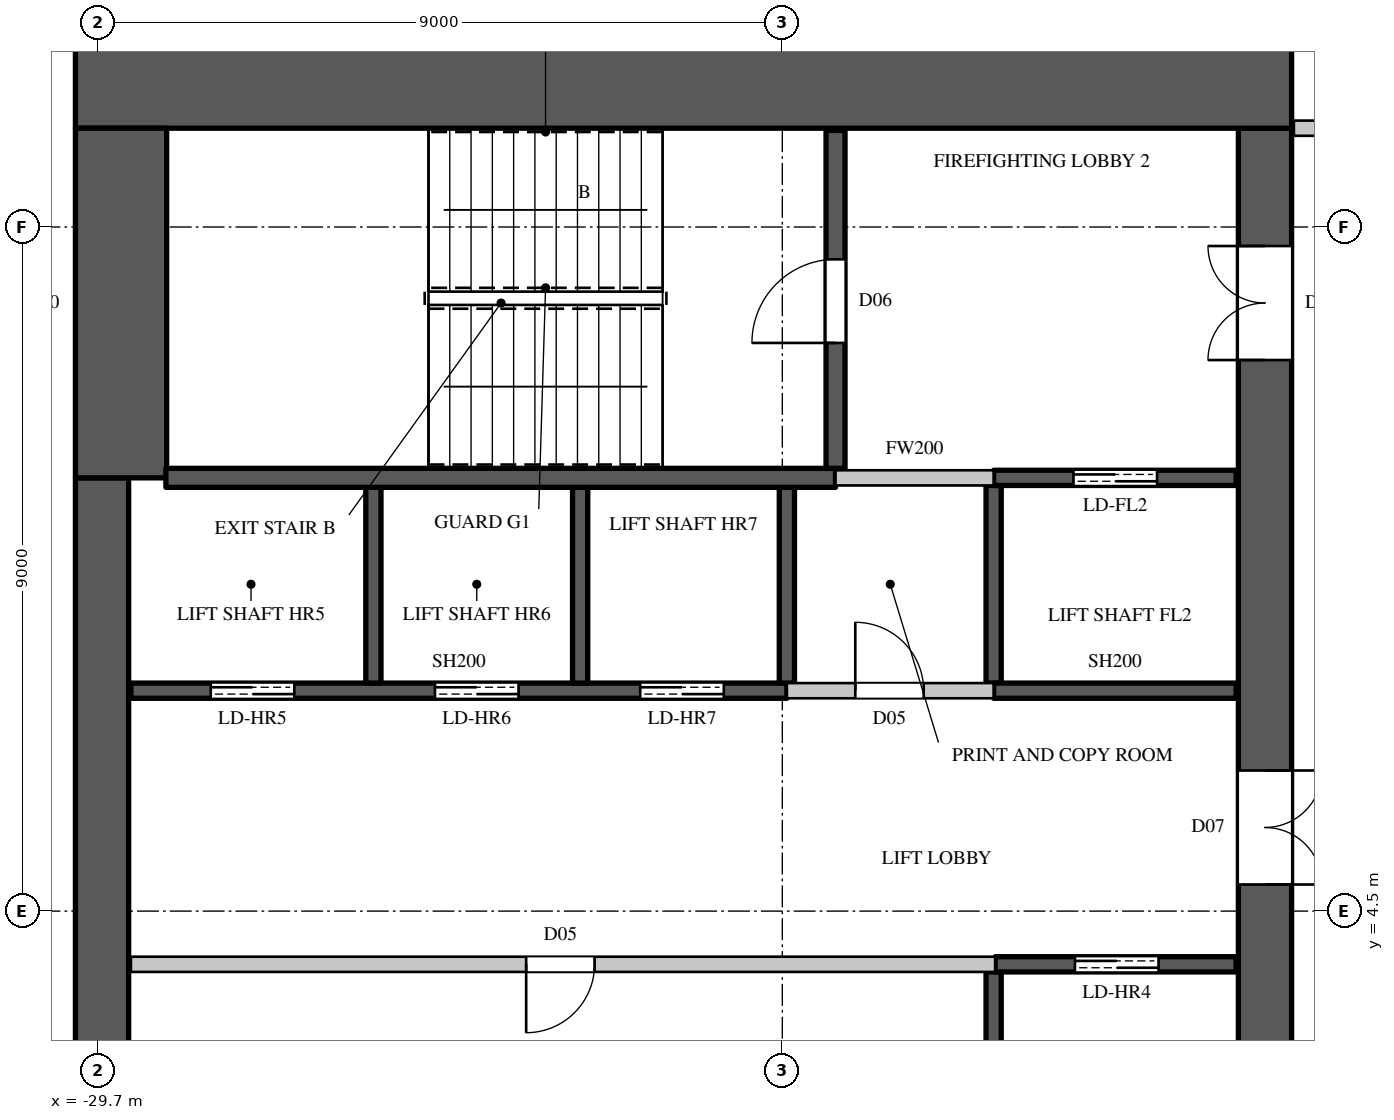
"""IFC4 building model, lengths in metres.
Left out: names, types, materials, properties, quantities, classifications, styles, units other than length and angle.
Written with IfcOpenShell. Run it as: python <this file> out.ifc"""

import sys

from ifc_helpers import new_model, si_unit, direction, frame, frame_2d, origin, place, context, subcontext, project, spatial, rectangle, extrude, element, fill, save


model = new_model("IFC4")
c1 = context("Model", 3, precision=1e-05, world=origin(), true_north=direction((0.0, 1.0)))
c2 = subcontext(c1, "Body", "Model", "MODEL_VIEW")
j1 = project(units=[si_unit("LENGTHUNIT", "METRE"), si_unit("PLANEANGLEUNIT", "RADIAN")], contexts=[c1])
p1 = place(None, origin())
s1 = spatial("IfcSite", under=j1, at=p1, CompositionType="ELEMENT")
p2 = place(p1, origin())
s2 = spatial("IfcBuilding", under=s1, at=p2, CompositionType="ELEMENT")
p3 = place(p2, frame((0.0, 0.0, 288.5)))
s3 = spatial("IfcBuildingStorey", under=s2, at=p3, CompositionType="ELEMENT", Elevation=288.5)
p4 = place(p3, frame((-30.0, 15.4, 0.0), z_axis=(0.0, 0.0, 1.0), x_axis=(1.0, 0.0, 0.0)))
e1 = element("IfcWall", 1, at=p4, inside=s3, PredefinedType="SHEAR", context=c2, shape_type="SweptSolid", body=[
    extrude(rectangle(XDim=16.0, YDim=1.2, at=frame_2d((8.0, 0.0))), origin(), (0.0, 0.0, 1.0), 4.1),
])
p5 = place(p3, frame((-14.35, -14.8, 0.0), z_axis=(0.0, 0.0, 1.0), x_axis=(0.0, 1.0, 0.0)))
e2 = element("IfcWall", 2, at=p5, inside=s3, PredefinedType="SHEAR", context=c2, shape_type="SweptSolid", body=[
    extrude(rectangle(XDim=29.6, YDim=0.7, at=frame_2d((14.8, 0.0))), origin(), (0.0, 0.0, 1.0), 4.1),
])
p6 = place(p5, frame((1.55, 0.0, 0.0)))
e3 = element("IfcOpeningElement", 3, at=p6, cuts=e2, PredefinedType="OPENING", context=c2, shape_type="SweptSolid", body=[
    extrude(rectangle(XDim=1.5, YDim=2.4, at=frame_2d((0.75, 1.2))), frame((0.0, 0.36, 0.0), z_axis=(0.0, -1.0, 0.0), x_axis=(1.0, 0.0, 0.0)), (0.0, 0.0, 1.0), 0.72),
])
p7 = place(p5, frame((26.55, 0.0, 0.0)))
e4 = element("IfcOpeningElement", 4, at=p7, cuts=e2, PredefinedType="OPENING", context=c2, shape_type="SweptSolid", body=[
    extrude(rectangle(XDim=1.5, YDim=2.4, at=frame_2d((0.75, 1.2))), frame((0.0, 0.36, 0.0), z_axis=(0.0, -1.0, 0.0), x_axis=(1.0, 0.0, 0.0)), (0.0, 0.0, 1.0), 0.72),
])
p8 = place(p5, frame((8.45, 0.0, 0.0)))
e5 = element("IfcOpeningElement", 5, at=p8, cuts=e2, PredefinedType="OPENING", context=c2, shape_type="SweptSolid", body=[
    extrude(rectangle(XDim=1.5, YDim=2.4, at=frame_2d((0.75, 1.2))), frame((0.0, 0.36, 0.0), z_axis=(0.0, -1.0, 0.0), x_axis=(1.0, 0.0, 0.0)), (0.0, 0.0, 1.0), 0.72),
])
p9 = place(p5, frame((19.65, 0.0, 0.0)))
e6 = element("IfcOpeningElement", 6, at=p9, cuts=e2, PredefinedType="OPENING", context=c2, shape_type="SweptSolid", body=[
    extrude(rectangle(XDim=1.5, YDim=2.4, at=frame_2d((0.75, 1.2))), frame((0.0, 0.36, 0.0), z_axis=(0.0, -1.0, 0.0), x_axis=(1.0, 0.0, 0.0)), (0.0, 0.0, 1.0), 0.72),
])
p10 = place(p5, frame((14.5, 0.0, 0.0)))
e7 = element("IfcOpeningElement", 7, at=p10, cuts=e2, PredefinedType="OPENING", context=c2, shape_type="SweptSolid", body=[
    extrude(rectangle(XDim=0.6, YDim=2.0, at=frame_2d((0.3, 1.0))), frame((0.0, 0.36, 0.0), z_axis=(0.0, -1.0, 0.0), x_axis=(1.0, 0.0, 0.0)), (0.0, 0.0, 1.0), 0.72),
])
p11 = place(p3, frame((-29.65, -10.2, 0.0), z_axis=(0.0, 0.0, 1.0), x_axis=(0.0, 1.0, 0.0)))
e8 = element("IfcWall", 8, at=p11, inside=s3, PredefinedType="SHEAR", context=c2, shape_type="SweptSolid", body=[
    extrude(rectangle(XDim=20.4, YDim=0.7, at=frame_2d((10.2, 0.0))), origin(), (0.0, 0.0, 1.0), 4.1),
])
p12 = place(p3, frame((-29.4, 10.2, 0.0), z_axis=(0.0, 0.0, 1.0), x_axis=(0.0, 1.0, 0.0)))
e9 = element("IfcWall", 9, at=p12, inside=s3, PredefinedType="SHEAR", context=c2, shape_type="SweptSolid", body=[
    extrude(rectangle(XDim=4.6, YDim=1.2, at=frame_2d((2.3, 0.0))), origin(), (0.0, 0.0, 1.0), 4.1),
])
p13 = place(p3, frame((-20.64, 7.4, 0.0), z_axis=(0.0, 0.0, 1.0), x_axis=(1.0, 0.0, 0.0)))
e10 = element("IfcWall", 10, at=p13, inside=s3, PredefinedType="PARTITIONING", context=c2, shape_type="SweptSolid", body=[
    extrude(rectangle(XDim=2.72, YDim=0.2, at=frame_2d((1.36, 0.0))), origin(), (0.0, 0.0, 1.0), 3.8),
])
p14 = place(p13, frame((0.9, 0.0, 0.0)))
e11 = element("IfcOpeningElement", 11, at=p14, cuts=e10, PredefinedType="OPENING", context=c2, shape_type="SweptSolid", body=[
    extrude(rectangle(XDim=0.9, YDim=2.2, at=frame_2d((0.45, 1.1))), frame((0.0, 0.11, 0.0), z_axis=(0.0, -1.0, 0.0), x_axis=(1.0, 0.0, 0.0)), (0.0, 0.0, 1.0), 0.22),
])
p15 = place(p3, frame((-20.0, 10.2, 0.0), z_axis=(0.0, 0.0, 1.0), x_axis=(1.0, 0.0, 0.0)))
e12 = element("IfcWall", 12, at=p15, inside=s3, PredefinedType="PARTITIONING", context=c2, shape_type="SweptSolid", body=[
    extrude(rectangle(XDim=2.08, YDim=0.2, at=frame_2d((1.04, 0.0))), origin(), (0.0, 0.0, 1.0), 3.8),
])
p16 = place(p3, frame((-13.97, 14.8, 0.0), z_axis=(0.0, 0.0, 1.0), x_axis=(1.0, 0.0, 0.0)))
e13 = element("IfcWall", 13, at=p16, inside=s3, PredefinedType="PARTITIONING", context=c2, shape_type="SweptSolid", body=[
    extrude(rectangle(XDim=2.87, YDim=0.2, at=frame_2d((1.435, 0.0))), origin(), (0.0, 0.0, 1.0), 3.8),
])
p17 = place(p3, frame((-29.27, 3.8, 0.0), z_axis=(0.0, 0.0, 1.0), x_axis=(1.0, 0.0, 0.0)))
e14 = element("IfcWall", 14, at=p17, inside=s3, PredefinedType="PARTITIONING", context=c2, shape_type="SweptSolid", body=[
    extrude(rectangle(XDim=11.37, YDim=0.2, at=frame_2d((5.685, 0.0))), origin(), (0.0, 0.0, 1.0), 3.8),
])
p18 = place(p17, frame((5.2, 0.0, 0.0)))
e15 = element("IfcOpeningElement", 15, at=p18, cuts=e14, PredefinedType="OPENING", context=c2, shape_type="SweptSolid", body=[
    extrude(rectangle(XDim=0.9, YDim=2.2, at=frame_2d((0.45, 1.1))), frame((0.0, 0.11, 0.0), z_axis=(0.0, -1.0, 0.0), x_axis=(1.0, 0.0, 0.0)), (0.0, 0.0, 1.0), 0.22),
])
p19 = place(p3, frame((-29.27, 7.4, 0.0), z_axis=(0.0, 0.0, 1.0), x_axis=(1.0, 0.0, 0.0)))
e16 = element("IfcWall", 16, at=p19, inside=s3, PredefinedType="SHEAR", context=c2, shape_type="SweptSolid", body=[
    extrude(rectangle(XDim=8.63, YDim=0.2, at=frame_2d((4.315, 0.0))), origin(), (0.0, 0.0, 1.0), 3.8),
])
p20 = place(p19, frame((1.05, 0.0, 0.0)))
e17 = element("IfcOpeningElement", 17, at=p20, cuts=e16, PredefinedType="OPENING", context=c2, shape_type="SweptSolid", body=[
    extrude(rectangle(XDim=1.1, YDim=2.2, at=frame_2d((0.55, 1.1))), frame((0.0, 0.11, 0.0), z_axis=(0.0, -1.0, 0.0), x_axis=(1.0, 0.0, 0.0)), (0.0, 0.0, 1.0), 0.22),
])
p21 = place(p19, frame((4.0, 0.0, 0.0)))
e18 = element("IfcOpeningElement", 18, at=p21, cuts=e16, PredefinedType="OPENING", context=c2, shape_type="SweptSolid", body=[
    extrude(rectangle(XDim=1.1, YDim=2.2, at=frame_2d((0.55, 1.1))), frame((0.0, 0.11, 0.0), z_axis=(0.0, -1.0, 0.0), x_axis=(1.0, 0.0, 0.0)), (0.0, 0.0, 1.0), 0.22),
])
p22 = place(p19, frame((6.7, 0.0, 0.0)))
e19 = element("IfcOpeningElement", 19, at=p22, cuts=e16, PredefinedType="OPENING", context=c2, shape_type="SweptSolid", body=[
    extrude(rectangle(XDim=1.1, YDim=2.2, at=frame_2d((0.55, 1.1))), frame((0.0, 0.11, 0.0), z_axis=(0.0, -1.0, 0.0), x_axis=(1.0, 0.0, 0.0)), (0.0, 0.0, 1.0), 0.22),
])
for number, where, z_axis, x_axis in (
    (20, (-26.08, 7.5, 0.0), (0.0, 0.0, 1.0), (0.0, 1.0, 0.0)),
    (21, (-23.36, 7.5, 0.0), (0.0, 0.0, 1.0), (0.0, 1.0, 0.0)),
):
    element("IfcWall", number, at=place(p3, frame(where, z_axis=z_axis, x_axis=x_axis)), inside=s3, PredefinedType="SHEAR", context=c2, shape_type="SweptSolid", body=[
        extrude(rectangle(XDim=2.575, YDim=0.2, at=frame_2d((1.288, 0.0))), origin(), (0.0, 0.0, 1.0), 4.1),
    ])
p23 = place(p3, frame((-20.64, 7.5, 0.0), z_axis=(0.0, 0.0, 1.0), x_axis=(0.0, 1.0, 0.0)))
e22 = element("IfcWall", 22, at=p23, inside=s3, PredefinedType="SHEAR", context=c2, shape_type="SweptSolid", body=[
    extrude(rectangle(XDim=2.575, YDim=0.2, at=frame_2d((1.288, 0.0))), origin(), (0.0, 0.0, 1.0), 3.8),
])
p24 = place(p3, frame((-17.92, 1.1, 0.0), z_axis=(0.0, 0.0, 1.0), x_axis=(0.0, 1.0, 0.0)))
e23 = element("IfcWall", 23, at=p24, inside=s3, PredefinedType="SHEAR", context=c2, shape_type="SweptSolid", body=[
    extrude(rectangle(XDim=2.6, YDim=0.2, at=frame_2d((1.3, 0.0))), origin(), (0.0, 0.0, 1.0), 3.8),
])
p25 = place(p3, frame((-17.9, 3.8, 0.0), z_axis=(0.0, 0.0, 1.0), x_axis=(1.0, 0.0, 0.0)))
e24 = element("IfcWall", 24, at=p25, inside=s3, PredefinedType="SHEAR", context=c2, shape_type="SweptSolid", body=[
    extrude(rectangle(XDim=3.17, YDim=0.2, at=frame_2d((1.585, 0.0))), origin(), (0.0, 0.0, 1.0), 3.8),
])
p26 = place(p25, frame((1.05, 0.0, 0.0)))
e25 = element("IfcOpeningElement", 25, at=p26, cuts=e24, PredefinedType="OPENING", context=c2, shape_type="SweptSolid", body=[
    extrude(rectangle(XDim=1.1, YDim=2.2, at=frame_2d((0.55, 1.1))), frame((0.0, 0.11, 0.0), z_axis=(0.0, -1.0, 0.0), x_axis=(1.0, 0.0, 0.0)), (0.0, 0.0, 1.0), 0.22),
])
p27 = place(p3, frame((-17.92, 7.5, 0.0), z_axis=(0.0, 0.0, 1.0), x_axis=(0.0, 1.0, 0.0)))
e26 = element("IfcWall", 26, at=p27, inside=s3, PredefinedType="SHEAR", context=c2, shape_type="SweptSolid", body=[
    extrude(rectangle(XDim=2.6, YDim=0.2, at=frame_2d((1.3, 0.0))), origin(), (0.0, 0.0, 1.0), 3.8),
])
p28 = place(p3, frame((-17.92, 7.4, 0.0), z_axis=(0.0, 0.0, 1.0), x_axis=(1.0, 0.0, 0.0)))
e27 = element("IfcWall", 27, at=p28, inside=s3, PredefinedType="SHEAR", context=c2, shape_type="SweptSolid", body=[
    extrude(rectangle(XDim=3.19, YDim=0.2, at=frame_2d((1.595, 0.0))), origin(), (0.0, 0.0, 1.0), 3.8),
])
p29 = place(p3, frame((-17.92, 10.2, 0.0), z_axis=(0.0, 0.0, 1.0), x_axis=(1.0, 0.0, 0.0)))
e28 = element("IfcWall", 28, at=p29, inside=s3, PredefinedType="SHEAR", context=c2, shape_type="SweptSolid", body=[
    extrude(rectangle(XDim=3.19, YDim=0.2, at=frame_2d((1.595, 0.0))), origin(), (0.0, 0.0, 1.0), 3.8),
])
p30 = place(p29, frame((1.05, 0.0, 0.0)))
e29 = element("IfcOpeningElement", 29, at=p30, cuts=e28, PredefinedType="OPENING", context=c2, shape_type="SweptSolid", body=[
    extrude(rectangle(XDim=1.1, YDim=2.2, at=frame_2d((0.55, 1.1))), frame((0.0, 0.11, 0.0), z_axis=(0.0, -1.0, 0.0), x_axis=(1.0, 0.0, 0.0)), (0.0, 0.0, 1.0), 0.22),
])
p31 = place(p3, frame((-28.81, 10.2, 0.0), z_axis=(0.0, 0.0, 1.0), x_axis=(1.0, 0.0, 0.0)))
e30 = element("IfcWall", 30, at=p31, inside=s3, PredefinedType="SHEAR", context=c2, shape_type="SweptSolid", body=[
    extrude(rectangle(XDim=8.81, YDim=0.25, at=frame_2d((4.405, 0.0))), origin(), (0.0, 0.0, 1.0), 3.8),
])
p32 = place(p3, frame((-20.0, 10.325, 0.0), z_axis=(0.0, 0.0, 1.0), x_axis=(0.0, 1.0, 0.0)))
e31 = element("IfcWall", 31, at=p32, inside=s3, PredefinedType="SHEAR", context=c2, shape_type="SweptSolid", body=[
    extrude(rectangle(XDim=4.445, YDim=0.25, at=frame_2d((2.223, 0.0))), origin(), (0.0, 0.0, 1.0), 3.8),
])
p33 = place(p32, frame((1.65, 0.0, 0.0)))
e32 = element("IfcOpeningElement", 32, at=p33, cuts=e31, PredefinedType="OPENING", context=c2, shape_type="SweptSolid", body=[
    extrude(rectangle(XDim=1.1, YDim=2.2, at=frame_2d((0.55, 1.1))), frame((0.0, 0.135, 0.0), z_axis=(0.0, -1.0, 0.0), x_axis=(1.0, 0.0, 0.0)), (0.0, 0.0, 1.0), 0.27),
])
p34 = place(p33, origin())
e33 = element("IfcDoor", 33, at=p34, inside=s3, OperationType="SINGLE_SWING_LEFT", PredefinedType="DOOR", context=c2, shape_type="SweptSolid", body=[
    extrude(rectangle(XDim=1.1, YDim=2.2, at=frame_2d((0.55, 1.1))), frame((0.0, 0.025, 0.0), z_axis=(0.0, -1.0, 0.0), x_axis=(1.0, 0.0, 0.0)), (0.0, 0.0, 1.0), 0.05),
])
fill(e32, e33)
p35 = place(p18, origin())
e34 = element("IfcDoor", 34, at=p35, inside=s3, OperationType="SINGLE_SWING_RIGHT", PredefinedType="DOOR", context=c2, shape_type="SweptSolid", body=[
    extrude(rectangle(XDim=0.9, YDim=2.2, at=frame_2d((0.45, 1.1))), frame((0.0, 0.025, 0.0), z_axis=(0.0, -1.0, 0.0), x_axis=(1.0, 0.0, 0.0)), (0.0, 0.0, 1.0), 0.05),
])
fill(e15, e34)
p36 = place(p14, origin())
e35 = element("IfcDoor", 35, at=p36, inside=s3, OperationType="SINGLE_SWING_LEFT", PredefinedType="DOOR", context=c2, shape_type="SweptSolid", body=[
    extrude(rectangle(XDim=0.9, YDim=2.2, at=frame_2d((0.45, 1.1))), frame((0.0, 0.025, 0.0), z_axis=(0.0, -1.0, 0.0), x_axis=(1.0, 0.0, 0.0)), (0.0, 0.0, 1.0), 0.05),
])
fill(e11, e35)
p37 = place(p26, origin())
e36 = element("IfcDoor", 36, at=p37, inside=s3, OperationType="DOUBLE_DOOR_SLIDING", PredefinedType="DOOR", context=c2, shape_type="SweptSolid", body=[
    extrude(rectangle(XDim=1.1, YDim=2.2, at=frame_2d((0.55, 1.1))), frame((0.0, 0.025, 0.0), z_axis=(0.0, -1.0, 0.0), x_axis=(1.0, 0.0, 0.0)), (0.0, 0.0, 1.0), 0.05),
])
fill(e25, e36)
p38 = place(p20, origin())
e37 = element("IfcDoor", 37, at=p38, inside=s3, OperationType="DOUBLE_DOOR_SLIDING", PredefinedType="DOOR", context=c2, shape_type="SweptSolid", body=[
    extrude(rectangle(XDim=1.1, YDim=2.2, at=frame_2d((0.55, 1.1))), frame((0.0, 0.025, 0.0), z_axis=(0.0, -1.0, 0.0), x_axis=(1.0, 0.0, 0.0)), (0.0, 0.0, 1.0), 0.05),
])
fill(e17, e37)
p39 = place(p21, origin())
e38 = element("IfcDoor", 38, at=p39, inside=s3, OperationType="DOUBLE_DOOR_SLIDING", PredefinedType="DOOR", context=c2, shape_type="SweptSolid", body=[
    extrude(rectangle(XDim=1.1, YDim=2.2, at=frame_2d((0.55, 1.1))), frame((0.0, 0.025, 0.0), z_axis=(0.0, -1.0, 0.0), x_axis=(1.0, 0.0, 0.0)), (0.0, 0.0, 1.0), 0.05),
])
fill(e18, e38)
p40 = place(p22, origin())
e39 = element("IfcDoor", 39, at=p40, inside=s3, OperationType="DOUBLE_DOOR_SLIDING", PredefinedType="DOOR", context=c2, shape_type="SweptSolid", body=[
    extrude(rectangle(XDim=1.1, YDim=2.2, at=frame_2d((0.55, 1.1))), frame((0.0, 0.025, 0.0), z_axis=(0.0, -1.0, 0.0), x_axis=(1.0, 0.0, 0.0)), (0.0, 0.0, 1.0), 0.05),
])
fill(e19, e39)
p41 = place(p30, origin())
e40 = element("IfcDoor", 40, at=p41, inside=s3, OperationType="DOUBLE_DOOR_SLIDING", PredefinedType="DOOR", context=c2, shape_type="SweptSolid", body=[
    extrude(rectangle(XDim=1.1, YDim=2.2, at=frame_2d((0.55, 1.1))), frame((0.0, 0.025, 0.0), z_axis=(0.0, -1.0, 0.0), x_axis=(1.0, 0.0, 0.0)), (0.0, 0.0, 1.0), 0.05),
])
fill(e29, e40)
p42 = place(p7, origin())
e41 = element("IfcDoor", 41, at=p42, inside=s3, OperationType="DOUBLE_DOOR_SINGLE_SWING", PredefinedType="DOOR", context=c2, shape_type="SweptSolid", body=[
    extrude(rectangle(XDim=1.5, YDim=2.4, at=frame_2d((0.75, 1.2))), frame((0.0, 0.345, 0.0), z_axis=(0.0, -1.0, 0.0), x_axis=(1.0, 0.0, 0.0)), (0.0, 0.0, 1.0), 0.05),
])
fill(e4, e41)
p43 = place(p9, origin())
e42 = element("IfcDoor", 42, at=p43, inside=s3, OperationType="DOUBLE_DOOR_SINGLE_SWING", PredefinedType="DOOR", context=c2, shape_type="SweptSolid", body=[
    extrude(rectangle(XDim=1.5, YDim=2.4, at=frame_2d((0.75, 1.2))), frame((0.0, -0.295, 0.0), z_axis=(0.0, -1.0, 0.0), x_axis=(1.0, 0.0, 0.0)), (0.0, 0.0, 1.0), 0.05),
])
fill(e6, e42)
save(model, sys.argv[1])
